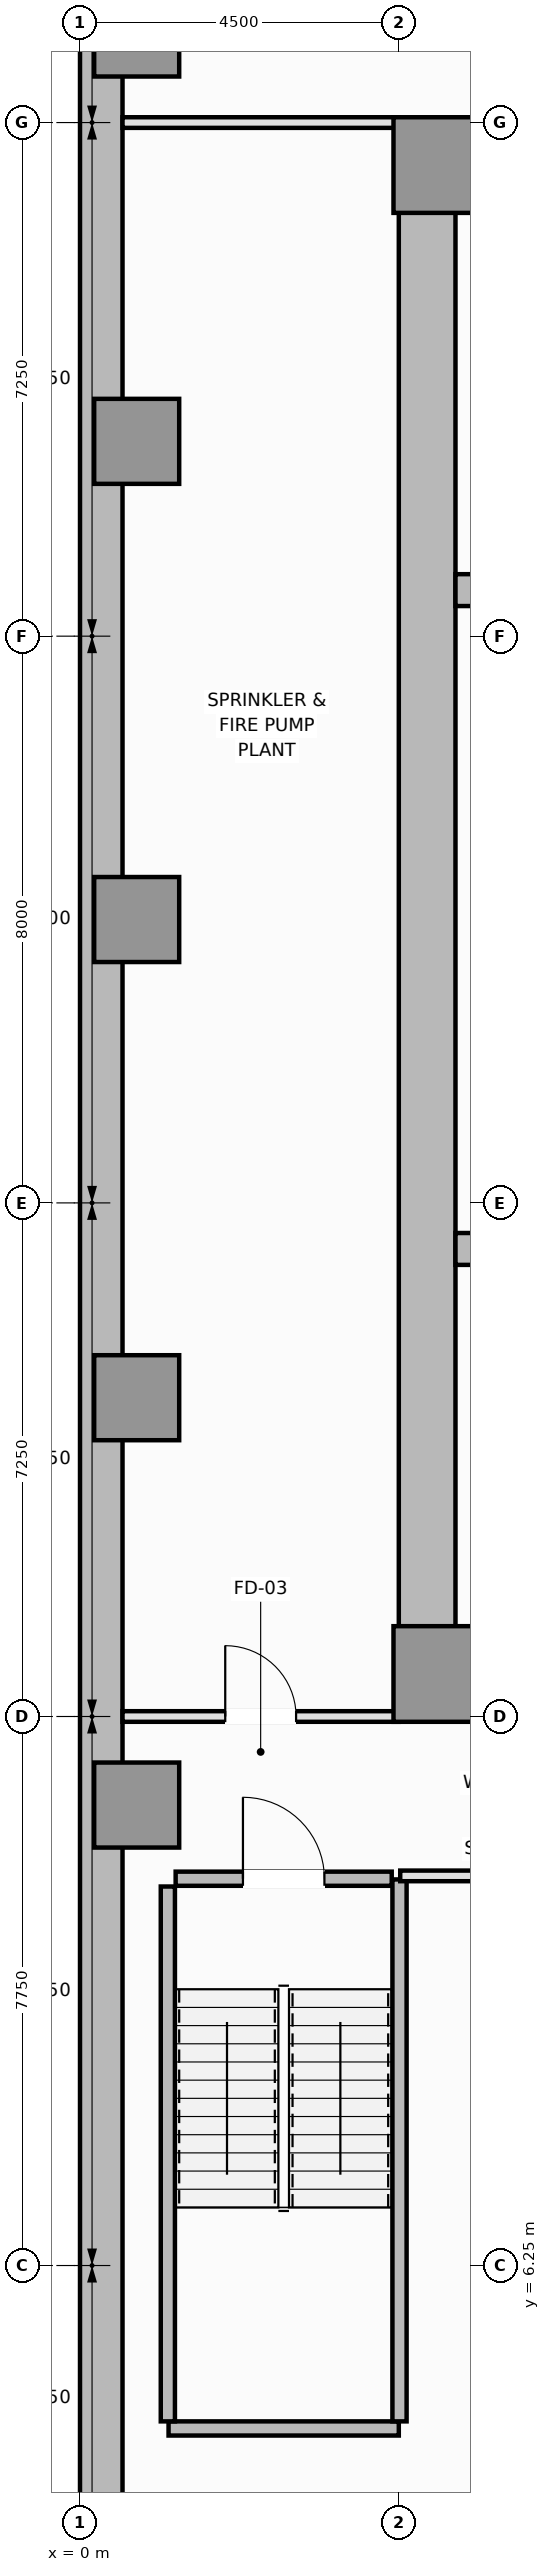
"""IFC4 building model, lengths in metres.
Left out: names, types, materials, properties, quantities, classifications, styles, units other than length and angle.
Written with IfcOpenShell. Run it as: python <this file> out.ifc"""

import sys

from ifc_helpers import new_model, si_unit, direction, frame, frame_2d, origin, origin_2d, place, context, subcontext, project, spatial, rectangle, extrude, element, fill, save


model = new_model("IFC4")
c1 = context("Model", 3, precision=1e-05, world=origin(), true_north=direction((0.0, 1.0)))
c2 = subcontext(c1, "Body", "Model", "MODEL_VIEW")
j1 = project(units=[si_unit("LENGTHUNIT", "METRE"), si_unit("PLANEANGLEUNIT", "RADIAN")], contexts=[c1])
p1 = place(None, origin())
s1 = spatial("IfcSite", under=j1, at=p1, CompositionType="ELEMENT")
p2 = place(p1, origin())
s2 = spatial("IfcBuilding", under=s1, at=p2, CompositionType="ELEMENT")
p3 = place(p2, frame((0.0, 0.0, -13.2)))
s3 = spatial("IfcBuildingStorey", under=s2, at=p3, CompositionType="ELEMENT", Elevation=-13.2)
p4 = place(p3, frame((0.3, 0.6, 0.0), z_axis=(0.0, 0.0, 1.0), x_axis=(0.0, 1.0, 0.0)))
e1 = element("IfcWall", 1, at=p4, inside=s3, PredefinedType="USERDEFINED", context=c2, shape_type="SweptSolid", body=[
    extrude(rectangle(XDim=49.3, YDim=0.6, at=frame_2d((24.65, 0.0))), origin(), (0.0, 0.0, 1.0), 4.2),
])
for number, where, z_axis, x_axis in (
    (2, (4.5, 14.4, 0.0), (0.0, 0.0, 1.0), (1.0, 0.0, 0.0)),
    (3, (4.5, 36.1, 0.0), (0.0, 0.0, 1.0), (1.0, 0.0, 0.0)),
):
    element("IfcWall", number, at=place(p3, frame(where, z_axis=z_axis, x_axis=x_axis)), inside=s3, PredefinedType="SHEAR", context=c2, shape_type="SweptSolid", body=[
        extrude(rectangle(XDim=13.5, YDim=0.8, at=frame_2d((6.75, 0.0))), origin(), (0.0, 0.0, 1.0), 4.2),
    ])
p5 = place(p3, frame((4.9, 14.8, 0.0), z_axis=(0.0, 0.0, 1.0), x_axis=(0.0, 1.0, 0.0)))
e4 = element("IfcWall", 4, at=p5, inside=s3, PredefinedType="SHEAR", context=c2, shape_type="SweptSolid", body=[
    extrude(rectangle(XDim=20.9, YDim=0.8, at=frame_2d((10.45, 0.0))), origin(), (0.0, 0.0, 1.0), 4.2),
])
for number, where, z_axis, x_axis in (
    (5, (5.3, 20.6, 0.0), (0.0, 0.0, 1.0), (1.0, 0.0, 0.0)),
    (6, (5.3, 29.9, 0.0), (0.0, 0.0, 1.0), (1.0, 0.0, 0.0)),
):
    element("IfcWall", number, at=place(p3, frame(where, z_axis=z_axis, x_axis=x_axis)), inside=s3, PredefinedType="SHEAR", context=c2, shape_type="SweptSolid", body=[
        extrude(rectangle(XDim=11.9, YDim=0.45, at=frame_2d((5.95, 0.0))), origin(), (0.0, 0.0, 1.0), 4.2),
    ])
for number, where, z_axis, x_axis in (
    (7, (5.1, 14.6, 0.0), (0.0, 0.0, 1.0), (1.0, 0.0, 0.0)),
    (8, (5.1, 35.9, 0.0), (0.0, 0.0, 1.0), (1.0, 0.0, 0.0)),
):
    element("IfcColumn", number, at=place(p3, frame(where, z_axis=z_axis, x_axis=x_axis)), inside=s3, PredefinedType="PILASTER", context=c2, shape_type="SweptSolid", body=[
        extrude(rectangle(XDim=1.35, YDim=1.35, at=origin_2d()), origin(), (0.0, 0.0, 1.0), 4.2),
    ])
for number, where, z_axis, x_axis in (
    (9, (0.8, 12.75, 0.0), (0.0, 0.0, 1.0), (1.0, 0.0, 0.0)),
    (10, (0.8, 18.5, 0.0), (0.0, 0.0, 1.0), (1.0, 0.0, 0.0)),
    (11, (0.8, 25.25, 0.0), (0.0, 0.0, 1.0), (1.0, 0.0, 0.0)),
    (12, (0.8, 32.0, 0.0), (0.0, 0.0, 1.0), (1.0, 0.0, 0.0)),
    (13, (0.8, 37.75, 0.0), (0.0, 0.0, 1.0), (1.0, 0.0, 0.0)),
):
    element("IfcColumn", number, at=place(p3, frame(where, z_axis=z_axis, x_axis=x_axis)), inside=s3, PredefinedType="COLUMN", context=c2, shape_type="SweptSolid", body=[
        extrude(rectangle(XDim=1.2, YDim=1.2, at=origin_2d()), origin(), (0.0, 0.0, 1.0), 4.2),
    ])
p6 = place(p3, frame((1.25, 3.95, 0.0), z_axis=(0.0, 0.0, 1.0), x_axis=(1.0, 0.0, 0.0)))
e14 = element("IfcWall", 14, at=p6, inside=s3, PredefinedType="SOLIDWALL", context=c2, shape_type="SweptSolid", body=[
    extrude(rectangle(XDim=3.25, YDim=0.2, at=frame_2d((1.625, 0.0))), origin(), (0.0, 0.0, 1.0), 4.2),
])
p7 = place(p3, frame((1.24, 4.05, 0.0), z_axis=(0.0, 0.0, 1.0), x_axis=(0.0, 1.0, 0.0)))
e15 = element("IfcWall", 15, at=p7, inside=s3, PredefinedType="SOLIDWALL", context=c2, shape_type="SweptSolid", body=[
    extrude(rectangle(XDim=7.55, YDim=0.2, at=frame_2d((3.775, 0.0))), origin(), (0.0, 0.0, 1.0), 4.2),
])
p8 = place(p3, frame((4.51, 4.05, 0.0), z_axis=(0.0, 0.0, 1.0), x_axis=(0.0, 1.0, 0.0)))
e16 = element("IfcWall", 16, at=p8, inside=s3, PredefinedType="SOLIDWALL", context=c2, shape_type="SweptSolid", body=[
    extrude(rectangle(XDim=7.65, YDim=0.2, at=frame_2d((3.825, 0.0))), origin(), (0.0, 0.0, 1.0), 4.2),
])
p9 = place(p3, frame((1.35, 11.71, 0.0), z_axis=(0.0, 0.0, 1.0), x_axis=(1.0, 0.0, 0.0)))
e17 = element("IfcWall", 17, at=p9, inside=s3, PredefinedType="SOLIDWALL", context=c2, shape_type="SweptSolid", body=[
    extrude(rectangle(XDim=3.05, YDim=0.2, at=frame_2d((1.525, 0.0))), origin(), (0.0, 0.0, 1.0), 4.2),
])
p10 = place(p9, frame((0.95, 0.0, 0.0)))
e18 = element("IfcOpeningElement", 18, at=p10, cuts=e17, PredefinedType="OPENING", context=c2, shape_type="SweptSolid", body=[
    extrude(rectangle(XDim=1.15, YDim=2.15, at=frame_2d((0.575, 1.075))), frame((0.0, 0.11, 0.0), z_axis=(0.0, -1.0, 0.0), x_axis=(1.0, 0.0, 0.0)), (0.0, 0.0, 1.0), 0.22),
])
p11 = place(p3, frame((4.52, 11.75, 0.0), z_axis=(0.0, 0.0, 1.0), x_axis=(1.0, 0.0, 0.0)))
e19 = element("IfcWall", 19, at=p11, inside=s3, PredefinedType="PARTITIONING", context=c2, shape_type="SweptSolid", body=[
    extrude(rectangle(XDim=13.48, YDim=0.15, at=frame_2d((6.74, 0.0))), origin(), (0.0, 0.0, 1.0), 4.0),
])
p12 = place(p11, frame((7.961, 0.0, 0.0)))
e20 = element("IfcOpeningElement", 20, at=p12, cuts=e19, PredefinedType="OPENING", context=c2, shape_type="SweptSolid", body=[
    extrude(rectangle(XDim=1.0, YDim=2.15, at=frame_2d((0.5, 1.075))), frame((0.0, 0.085, 0.0), z_axis=(0.0, -1.0, 0.0), x_axis=(1.0, 0.0, 0.0)), (0.0, 0.0, 1.0), 0.17),
])
p13 = place(p3, frame((0.6, 14.0, 0.0), z_axis=(0.0, 0.0, 1.0), x_axis=(1.0, 0.0, 0.0)))
e21 = element("IfcWall", 21, at=p13, inside=s3, PredefinedType="PARTITIONING", context=c2, shape_type="SweptSolid", body=[
    extrude(rectangle(XDim=3.9, YDim=0.15, at=frame_2d((1.95, 0.0))), origin(), (0.0, 0.0, 1.0), 4.0),
])
p14 = place(p13, frame((1.45, 0.0, 0.0)))
e22 = element("IfcOpeningElement", 22, at=p14, cuts=e21, PredefinedType="OPENING", context=c2, shape_type="SweptSolid", body=[
    extrude(rectangle(XDim=1.0, YDim=2.15, at=frame_2d((0.5, 1.075))), frame((0.0, 0.085, 0.0), z_axis=(0.0, -1.0, 0.0), x_axis=(1.0, 0.0, 0.0)), (0.0, 0.0, 1.0), 0.17),
])
p15 = place(p3, frame((0.6, 36.5, 0.0), z_axis=(0.0, 0.0, 1.0), x_axis=(1.0, 0.0, 0.0)))
e23 = element("IfcWall", 23, at=p15, inside=s3, PredefinedType="PARTITIONING", context=c2, shape_type="SweptSolid", body=[
    extrude(rectangle(XDim=3.9, YDim=0.15, at=frame_2d((1.95, 0.0))), origin(), (0.0, 0.0, 1.0), 4.0),
])
p16 = place(p10, origin())
e24 = element("IfcDoor", 24, at=p16, inside=s3, OperationType="SINGLE_SWING_LEFT", PredefinedType="DOOR", context=c2, shape_type="SweptSolid", body=[
    extrude(rectangle(XDim=1.15, YDim=2.15, at=frame_2d((0.575, 1.075))), frame((0.0, 0.025, 0.0), z_axis=(0.0, -1.0, 0.0), x_axis=(1.0, 0.0, 0.0)), (0.0, 0.0, 1.0), 0.05),
])
fill(e18, e24)
p17 = place(p14, origin())
e25 = element("IfcDoor", 25, at=p17, inside=s3, OperationType="SINGLE_SWING_LEFT", PredefinedType="DOOR", context=c2, shape_type="SweptSolid", body=[
    extrude(rectangle(XDim=1.0, YDim=2.15, at=frame_2d((0.5, 1.075))), frame((0.0, 0.025, 0.0), z_axis=(0.0, -1.0, 0.0), x_axis=(1.0, 0.0, 0.0)), (0.0, 0.0, 1.0), 0.05),
])
fill(e22, e25)
save(model, sys.argv[1])
